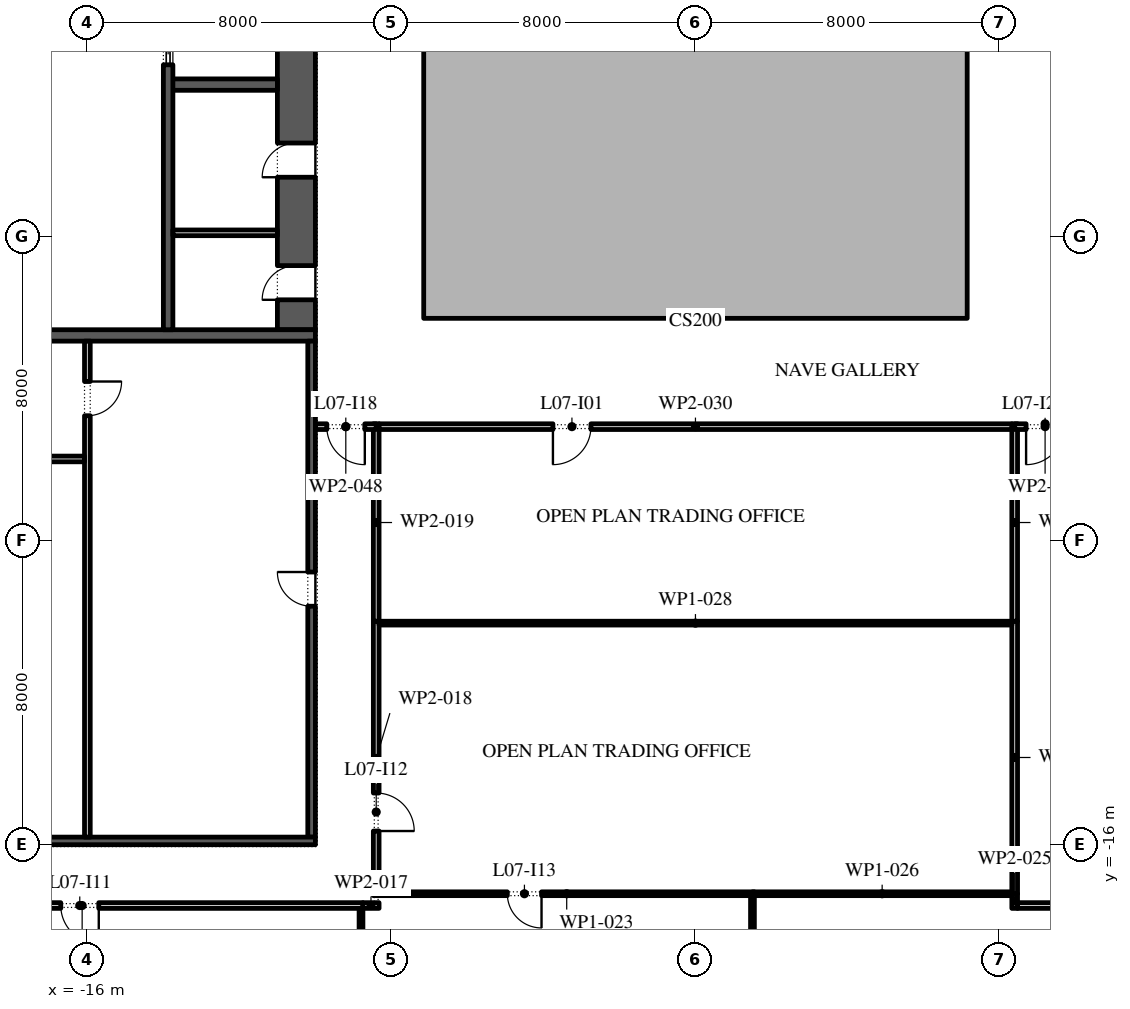
"""IFC4 building model, lengths in metres.
Left out: names, types, materials, properties, quantities, classifications, styles, units other than length and angle.
Written with IfcOpenShell. Run it as: python <this file> out.ifc"""

import sys

from ifc_helpers import new_model, si_unit, direction, frame, frame_2d, origin, place, context, subcontext, project, spatial, polyline, rectangle, outline, extrude, element, fill, save


model = new_model("IFC4")
c1 = context("Model", 3, precision=1e-05, world=origin(), true_north=direction((0.0, 1.0)))
c2 = subcontext(c1, "Body", "Model", "MODEL_VIEW")
j1 = project(units=[si_unit("LENGTHUNIT", "METRE"), si_unit("PLANEANGLEUNIT", "RADIAN")], contexts=[c1])
p1 = place(None, origin())
s1 = spatial("IfcSite", under=j1, at=p1, CompositionType="ELEMENT")
p2 = place(p1, origin())
s2 = spatial("IfcBuilding", under=s1, at=p2, CompositionType="ELEMENT")
p3 = place(p2, frame((0.0, 0.0, 39.6)))
s3 = spatial("IfcBuildingStorey", under=s2, at=p3, CompositionType="ELEMENT", Elevation=39.6)
p4 = place(p3, origin())
e1 = element("IfcWall", 1, at=p4, inside=s3, PredefinedType="STANDARD", context=c2, shape_type="SweptSolid", body=[
    extrude(outline(polyline([(-7.15, -2.15), (7.15, -2.15), (7.15, 16.15), (-7.15, 16.15), (-7.15, -2.15)]), holes=[polyline([(-7.0, -2.0), (-7.0, 16.0), (7.0, 16.0), (7.0, -2.0), (-7.0, -2.0)])]), origin(), (0.0, 0.0, 1.0), 4.0),
])
p5 = place(p3, frame((-10.5, -2.45, 0.0), z_axis=(0.0, 0.0, 1.0), x_axis=(0.0, 1.0, 0.0)))
e2 = element("IfcWall", 2, at=p5, inside=s3, PredefinedType="SHEAR", context=c2, shape_type="SweptSolid", body=[
    extrude(rectangle(XDim=27.9, YDim=1.0, at=frame_2d((13.95, 0.0))), origin(), (0.0, 0.0, 1.0), 4.0),
])
p6 = place(p5, frame((23.65, 0.0, 0.0)))
e3 = element("IfcOpeningElement", 3, at=p6, cuts=e2, PredefinedType="OPENING", context=c2, shape_type="SweptSolid", body=[
    extrude(rectangle(XDim=2.4, YDim=2.1, at=frame_2d((1.2, 1.05))), frame((0.0, 0.51, 0.0), z_axis=(0.0, -1.0, 0.0), x_axis=(1.0, 0.0, 0.0)), (0.0, 0.0, 1.0), 1.02),
])
p7 = place(p5, frame((0.788, 0.0, 0.0)))
e4 = element("IfcOpeningElement", 4, at=p7, cuts=e2, PredefinedType="OPENING", context=c2, shape_type="SweptSolid", body=[
    extrude(rectangle(XDim=0.9, YDim=2.1, at=frame_2d((0.45, 1.05))), frame((0.0, 0.51, 0.0), z_axis=(0.0, -1.0, 0.0), x_axis=(1.0, 0.0, 0.0)), (0.0, 0.0, 1.0), 1.02),
])
p8 = place(p5, frame((4.012, 0.0, 0.0)))
e5 = element("IfcOpeningElement", 5, at=p8, cuts=e2, PredefinedType="OPENING", context=c2, shape_type="SweptSolid", body=[
    extrude(rectangle(XDim=0.9, YDim=2.1, at=frame_2d((0.45, 1.05))), frame((0.0, 0.51, 0.0), z_axis=(0.0, -1.0, 0.0), x_axis=(1.0, 0.0, 0.0)), (0.0, 0.0, 1.0), 1.02),
])
p9 = place(p3, frame((-22.0, -2.6, 0.0), z_axis=(0.0, 0.0, 1.0), x_axis=(1.0, 0.0, 0.0)))
e6 = element("IfcWall", 6, at=p9, inside=s3, PredefinedType="SHEAR", context=c2, shape_type="SweptSolid", body=[
    extrude(rectangle(XDim=12.0, YDim=0.3, at=frame_2d((6.0, 0.0))), origin(), (0.0, 0.0, 1.0), 4.0),
])
p10 = place(p3, frame((-14.0, 4.0, 0.0), z_axis=(0.0, 0.0, 1.0), x_axis=(1.0, 0.0, 0.0)))
e7 = element("IfcWall", 7, at=p10, inside=s3, PredefinedType="SHEAR", context=c2, shape_type="SweptSolid", body=[
    extrude(rectangle(XDim=3.0, YDim=0.3, at=frame_2d((1.5, 0.0))), origin(), (0.0, 0.0, 1.0), 4.0),
])
p11 = place(p3, frame((-13.875, -2.45, 0.0), z_axis=(0.0, 0.0, 1.0), x_axis=(0.0, 1.0, 0.0)))
e8 = element("IfcWall", 8, at=p11, inside=s3, PredefinedType="SHEAR", context=c2, shape_type="SweptSolid", body=[
    extrude(rectangle(XDim=21.3, YDim=0.25, at=frame_2d((10.65, 0.0))), origin(), (0.0, 0.0, 1.0), 4.0),
])
p12 = place(p11, frame((10.396, 0.0, 0.0)))
e9 = element("IfcOpeningElement", 9, at=p12, cuts=e8, PredefinedType="OPENING", context=c2, shape_type="SweptSolid", body=[
    extrude(rectangle(XDim=0.9, YDim=2.1, at=frame_2d((0.45, 1.05))), frame((0.0, 0.135, 0.0), z_axis=(0.0, -1.0, 0.0), x_axis=(1.0, 0.0, 0.0)), (0.0, 0.0, 1.0), 0.27),
])
p13 = place(p11, frame((14.6, 0.0, 0.0)))
e10 = element("IfcOpeningElement", 10, at=p13, cuts=e8, PredefinedType="OPENING", context=c2, shape_type="SweptSolid", body=[
    extrude(rectangle(XDim=0.9, YDim=2.1, at=frame_2d((0.45, 1.05))), frame((0.0, 0.135, 0.0), z_axis=(0.0, -1.0, 0.0), x_axis=(1.0, 0.0, 0.0)), (0.0, 0.0, 1.0), 0.27),
])
p14 = place(p11, frame((18.775, 0.0, 0.0)))
e11 = element("IfcOpeningElement", 11, at=p14, cuts=e8, PredefinedType="OPENING", context=c2, shape_type="SweptSolid", body=[
    extrude(rectangle(XDim=0.9, YDim=2.1, at=frame_2d((0.45, 1.05))), frame((0.0, 0.135, 0.0), z_axis=(0.0, -1.0, 0.0), x_axis=(1.0, 0.0, 0.0)), (0.0, 0.0, 1.0), 0.27),
])
p15 = place(p11, frame((6.971, 0.0, 0.0)))
e12 = element("IfcOpeningElement", 12, at=p15, cuts=e8, PredefinedType="OPENING", context=c2, shape_type="SweptSolid", body=[
    extrude(rectangle(XDim=1.1, YDim=2.1, at=frame_2d((0.55, 1.05))), frame((0.0, 0.135, 0.0), z_axis=(0.0, -1.0, 0.0), x_axis=(1.0, 0.0, 0.0)), (0.0, 0.0, 1.0), 0.27),
])
p16 = place(p3, frame((-13.75, 0.1, 0.0), z_axis=(0.0, 0.0, 1.0), x_axis=(1.0, 0.0, 0.0)))
e13 = element("IfcWall", 13, at=p16, inside=s3, PredefinedType="PARTITIONING", context=c2, shape_type="SweptSolid", body=[
    extrude(rectangle(XDim=2.75, YDim=0.15, at=frame_2d((1.375, 0.0))), origin(), (0.0, 0.0, 1.0), 4.0),
])
p17 = place(p3, frame((-10.1, -15.8, 0.0), z_axis=(0.0, 0.0, 1.0), x_axis=(0.0, 1.0, 0.0)))
e14 = element("IfcWall", 14, at=p17, inside=s3, PredefinedType="SHEAR", context=c2, shape_type="SweptSolid", body=[
    extrude(rectangle(XDim=13.05, YDim=0.2, at=frame_2d((6.525, 0.0))), origin(), (0.0, 0.0, 1.0), 4.0),
])
p18 = place(p17, frame((6.075, 0.0, 0.0)))
e15 = element("IfcOpeningElement", 15, at=p18, cuts=e14, PredefinedType="OPENING", context=c2, shape_type="SweptSolid", body=[
    extrude(rectangle(XDim=0.9, YDim=2.1, at=frame_2d((0.45, 1.05))), frame((0.0, 0.11, 0.0), z_axis=(0.0, -1.0, 0.0), x_axis=(1.0, 0.0, 0.0)), (0.0, 0.0, 1.0), 0.22),
])
p19 = place(p3, frame((-22.0, -15.9, 0.0), z_axis=(0.0, 0.0, 1.0), x_axis=(1.0, 0.0, 0.0)))
e16 = element("IfcWall", 16, at=p19, inside=s3, PredefinedType="SHEAR", context=c2, shape_type="SweptSolid", body=[
    extrude(rectangle(XDim=12.0, YDim=0.2, at=frame_2d((6.0, 0.0))), origin(), (0.0, 0.0, 1.0), 4.0),
])
p20 = place(p3, frame((-16.0, -15.8, 0.0), z_axis=(0.0, 0.0, 1.0), x_axis=(0.0, 1.0, 0.0)))
e17 = element("IfcWall", 17, at=p20, inside=s3, PredefinedType="PARTITIONING", context=c2, shape_type="SweptSolid", body=[
    extrude(rectangle(XDim=13.05, YDim=0.15, at=frame_2d((6.525, 0.0))), origin(), (0.0, 0.0, 1.0), 4.0),
])
p21 = place(p20, frame((11.087, 0.0, 0.0)))
e18 = element("IfcOpeningElement", 18, at=p21, cuts=e17, PredefinedType="OPENING", context=c2, shape_type="SweptSolid", body=[
    extrude(rectangle(XDim=0.9, YDim=2.1, at=frame_2d((0.45, 1.05))), frame((0.0, 0.085, 0.0), z_axis=(0.0, -1.0, 0.0), x_axis=(1.0, 0.0, 0.0)), (0.0, 0.0, 1.0), 0.17),
])
p22 = place(p3, frame((-21.8, -5.85, 0.0), z_axis=(0.0, 0.0, 1.0), x_axis=(1.0, 0.0, 0.0)))
e19 = element("IfcWall", 19, at=p22, inside=s3, PredefinedType="PARTITIONING", context=c2, shape_type="SweptSolid", body=[
    extrude(rectangle(XDim=5.725, YDim=0.15, at=frame_2d((2.863, 0.0))), origin(), (0.0, 0.0, 1.0), 4.0),
])
p23 = place(p3, frame((-8.75, -17.6, 0.0), z_axis=(0.0, 0.0, 1.0), x_axis=(-1.0, 0.0, 0.0)))
e20 = element("IfcWall", 20, at=p23, inside=s3, PredefinedType="PARTITIONING", context=c2, shape_type="SweptSolid", body=[
    extrude(rectangle(XDim=14.775, YDim=0.15, at=frame_2d((7.387, 0.0))), origin(), (0.0, 0.0, 1.0), 4.0),
])
p24 = place(p23, frame((6.95, 0.0, 0.0)))
e21 = element("IfcOpeningElement", 21, at=p24, cuts=e20, PredefinedType="OPENING", context=c2, shape_type="SweptSolid", body=[
    extrude(rectangle(XDim=1.0, YDim=2.1, at=frame_2d((0.5, 1.05))), frame((0.0, 0.085, 0.0), z_axis=(0.0, -1.0, 0.0), x_axis=(1.0, 0.0, 0.0)), (0.0, 0.0, 1.0), 0.17),
])
p25 = place(p3, frame((-8.8, -17.675, 0.0), z_axis=(0.0, 0.0, 1.0), x_axis=(0.0, -1.0, 0.0)))
e22 = element("IfcWall", 22, at=p25, inside=s3, PredefinedType="PARTITIONING", context=c2, shape_type="SweptSolid", body=[
    extrude(rectangle(XDim=6.675, YDim=0.1, at=frame_2d((3.337, 0.0))), origin(), (0.0, 0.0, 1.0), 4.0),
])
p26 = place(p3, frame((-8.325, -17.6, 0.0), z_axis=(0.0, 0.0, 1.0), x_axis=(-1.0, 0.0, 0.0)))
e23 = element("IfcWall", 23, at=p26, inside=s3, PredefinedType="PARTITIONING", context=c2, shape_type="SweptSolid", body=[
    extrude(rectangle(XDim=0.425, YDim=0.15, at=frame_2d((0.212, 0.0))), origin(), (0.0, 0.0, 1.0), 4.0),
])
p27 = place(p3, frame((-8.4, -10.12, 0.0), z_axis=(0.0, 0.0, 1.0), x_axis=(0.0, -1.0, 0.0)))
e24 = element("IfcWall", 24, at=p27, inside=s3, PredefinedType="PARTITIONING", context=c2, shape_type="SweptSolid", body=[
    extrude(rectangle(XDim=7.22, YDim=0.15, at=frame_2d((3.61, 0.0))), origin(), (0.0, 0.0, 1.0), 4.0),
])
p28 = place(p27, frame((4.52, 0.0, 0.0)))
e25 = element("IfcOpeningElement", 25, at=p28, cuts=e24, PredefinedType="OPENING", context=c2, shape_type="SweptSolid", body=[
    extrude(rectangle(XDim=1.0, YDim=2.1, at=frame_2d((0.5, 1.05))), frame((0.0, 0.085, 0.0), z_axis=(0.0, -1.0, 0.0), x_axis=(1.0, 0.0, 0.0)), (0.0, 0.0, 1.0), 0.17),
])
p29 = place(p3, frame((-8.4, -4.925, 0.0), z_axis=(0.0, 0.0, 1.0), x_axis=(0.0, -1.0, 0.0)))
e26 = element("IfcWall", 26, at=p29, inside=s3, PredefinedType="PARTITIONING", context=c2, shape_type="SweptSolid", body=[
    extrude(rectangle(XDim=5.195, YDim=0.15, at=frame_2d((2.598, 0.0))), origin(), (0.0, 0.0, 1.0), 4.0),
])
p30 = place(p3, frame((1.55, -17.29, 0.0), z_axis=(0.0, 0.0, 1.0), x_axis=(-1.0, 0.0, 0.0)))
e27 = element("IfcWall", 27, at=p30, inside=s3, PredefinedType="PARTITIONING", context=c2, shape_type="SweptSolid", body=[
    extrude(rectangle(XDim=9.875, YDim=0.1, at=frame_2d((4.938, 0.0))), origin(), (0.0, 0.0, 1.0), 4.0),
])
p31 = place(p30, frame((5.6, 0.0, 0.0)))
e28 = element("IfcOpeningElement", 28, at=p31, cuts=e27, PredefinedType="OPENING", context=c2, shape_type="SweptSolid", body=[
    extrude(rectangle(XDim=0.9, YDim=2.1, at=frame_2d((0.45, 1.05))), frame((0.0, 0.06, 0.0), z_axis=(0.0, -1.0, 0.0), x_axis=(1.0, 0.0, 0.0)), (0.0, 0.0, 1.0), 0.12),
])
p32 = place(p3, frame((1.5, -17.34, 0.0), z_axis=(0.0, 0.0, 1.0), x_axis=(0.0, -1.0, 0.0)))
e29 = element("IfcWall", 29, at=p32, inside=s3, PredefinedType="PARTITIONING", context=c2, shape_type="SweptSolid", body=[
    extrude(rectangle(XDim=7.01, YDim=0.1, at=frame_2d((3.505, 0.0))), origin(), (0.0, 0.0, 1.0), 4.0),
])
p33 = place(p3, frame((8.4, -17.675, 0.0), z_axis=(0.0, 0.0, 1.0), x_axis=(0.0, 1.0, 0.0)))
e30 = element("IfcWall", 30, at=p33, inside=s3, PredefinedType="PARTITIONING", context=c2, shape_type="SweptSolid", body=[
    extrude(rectangle(XDim=0.385, YDim=0.15, at=frame_2d((0.192, 0.0))), origin(), (0.0, 0.0, 1.0), 4.0),
])
p34 = place(p3, frame((8.325, -17.29, 0.0), z_axis=(0.0, 0.0, 1.0), x_axis=(-1.0, 0.0, 0.0)))
e31 = element("IfcWall", 31, at=p34, inside=s3, PredefinedType="PARTITIONING", context=c2, shape_type="SweptSolid", body=[
    extrude(rectangle(XDim=6.825, YDim=0.1, at=frame_2d((3.413, 0.0))), origin(), (0.0, 0.0, 1.0), 4.0),
])
p35 = place(p3, frame((8.4, -17.29, 0.0), z_axis=(0.0, 0.0, 1.0), x_axis=(0.0, 1.0, 0.0)))
e32 = element("IfcWall", 32, at=p35, inside=s3, PredefinedType="PARTITIONING", context=c2, shape_type="SweptSolid", body=[
    extrude(rectangle(XDim=7.17, YDim=0.15, at=frame_2d((3.585, 0.0))), origin(), (0.0, 0.0, 1.0), 4.0),
])
p36 = place(p3, frame((8.325, -10.17, 0.0), z_axis=(0.0, 0.0, 1.0), x_axis=(-1.0, 0.0, 0.0)))
e33 = element("IfcWall", 33, at=p36, inside=s3, PredefinedType="PARTITIONING", context=c2, shape_type="SweptSolid", body=[
    extrude(rectangle(XDim=16.65, YDim=0.1, at=frame_2d((8.325, 0.0))), origin(), (0.0, 0.0, 1.0), 4.0),
])
p37 = place(p3, frame((8.4, -10.12, 0.0), z_axis=(0.0, 0.0, 1.0), x_axis=(0.0, 1.0, 0.0)))
e34 = element("IfcWall", 34, at=p37, inside=s3, PredefinedType="PARTITIONING", context=c2, shape_type="SweptSolid", body=[
    extrude(rectangle(XDim=5.195, YDim=0.15, at=frame_2d((2.598, 0.0))), origin(), (0.0, 0.0, 1.0), 4.0),
])
p38 = place(p3, frame((8.325, -5.0, 0.0), z_axis=(0.0, 0.0, 1.0), x_axis=(-1.0, 0.0, 0.0)))
e35 = element("IfcWall", 35, at=p38, inside=s3, PredefinedType="PARTITIONING", context=c2, shape_type="SweptSolid", body=[
    extrude(rectangle(XDim=16.65, YDim=0.15, at=frame_2d((8.325, 0.0))), origin(), (0.0, 0.0, 1.0), 4.0),
])
p39 = place(p38, frame((11.075, 0.0, 0.0)))
e36 = element("IfcOpeningElement", 36, at=p39, cuts=e35, PredefinedType="OPENING", context=c2, shape_type="SweptSolid", body=[
    extrude(rectangle(XDim=1.0, YDim=2.1, at=frame_2d((0.5, 1.05))), frame((0.0, 0.085, 0.0), z_axis=(0.0, -1.0, 0.0), x_axis=(1.0, 0.0, 0.0)), (0.0, 0.0, 1.0), 0.17),
])
p40 = place(p3, frame((15.0, -17.6, 0.0), z_axis=(0.0, 0.0, 1.0), x_axis=(-1.0, 0.0, 0.0)))
e37 = element("IfcWall", 37, at=p40, inside=s3, PredefinedType="PARTITIONING", context=c2, shape_type="SweptSolid", body=[
    extrude(rectangle(XDim=6.525, YDim=0.15, at=frame_2d((3.262, 0.0))), origin(), (0.0, 0.0, 1.0), 4.0),
])
p41 = place(p40, frame((2.7, 0.0, 0.0)))
e38 = element("IfcOpeningElement", 38, at=p41, cuts=e37, PredefinedType="OPENING", context=c2, shape_type="SweptSolid", body=[
    extrude(rectangle(XDim=1.0, YDim=2.1, at=frame_2d((0.5, 1.05))), frame((0.0, 0.085, 0.0), z_axis=(0.0, -1.0, 0.0), x_axis=(1.0, 0.0, 0.0)), (0.0, 0.0, 1.0), 0.17),
])
p42 = place(p3, frame((-8.4, -5.0, 0.0), z_axis=(0.0, 0.0, 1.0), x_axis=(-1.0, 0.0, 0.0)))
e39 = element("IfcWall", 39, at=p42, inside=s3, PredefinedType="PARTITIONING", context=c2, shape_type="SweptSolid", body=[
    extrude(rectangle(XDim=1.6, YDim=0.15, at=frame_2d((0.8, 0.0))), origin(), (0.0, 0.0, 1.0), 4.0),
])
p43 = place(p42, frame((0.3, 0.0, 0.0)))
e40 = element("IfcOpeningElement", 40, at=p43, cuts=e39, PredefinedType="OPENING", context=c2, shape_type="SweptSolid", body=[
    extrude(rectangle(XDim=1.0, YDim=2.1, at=frame_2d((0.5, 1.05))), frame((0.0, 0.085, 0.0), z_axis=(0.0, -1.0, 0.0), x_axis=(1.0, 0.0, 0.0)), (0.0, 0.0, 1.0), 0.17),
])
p44 = place(p3, frame((10.0, -5.0, 0.0), z_axis=(0.0, 0.0, 1.0), x_axis=(-1.0, 0.0, 0.0)))
e41 = element("IfcWall", 41, at=p44, inside=s3, PredefinedType="PARTITIONING", context=c2, shape_type="SweptSolid", body=[
    extrude(rectangle(XDim=1.6, YDim=0.15, at=frame_2d((0.8, 0.0))), origin(), (0.0, 0.0, 1.0), 4.0),
])
p45 = place(p44, frame((0.3, 0.0, 0.0)))
e42 = element("IfcOpeningElement", 42, at=p45, cuts=e41, PredefinedType="OPENING", context=c2, shape_type="SweptSolid", body=[
    extrude(rectangle(XDim=1.0, YDim=2.1, at=frame_2d((0.5, 1.05))), frame((0.0, 0.085, 0.0), z_axis=(0.0, -1.0, 0.0), x_axis=(1.0, 0.0, 0.0)), (0.0, 0.0, 1.0), 0.17),
])
p46 = place(p15, origin())
e43 = element("IfcDoor", 43, at=p46, inside=s3, OperationType="SLIDING_TO_LEFT", PredefinedType="DOOR", context=c2, shape_type="SweptSolid", body=[
    extrude(rectangle(XDim=1.1, YDim=2.1, at=frame_2d((0.55, 1.05))), frame((0.0, 0.025, 0.0), z_axis=(0.0, -1.0, 0.0), x_axis=(1.0, 0.0, 0.0)), (0.0, 0.0, 1.0), 0.05),
])
fill(e12, e43)
p47 = place(p7, origin())
e44 = element("IfcDoor", 44, at=p47, inside=s3, OperationType="SINGLE_SWING_RIGHT", PredefinedType="DOOR", context=c2, shape_type="SweptSolid", body=[
    extrude(rectangle(XDim=0.9, YDim=2.1, at=frame_2d((0.45, 1.05))), frame((0.0, 0.5, 0.0), z_axis=(0.0, -1.0, 0.0), x_axis=(1.0, 0.0, 0.0)), (0.0, 0.0, 1.0), 0.05),
])
fill(e4, e44)
p48 = place(p8, origin())
e45 = element("IfcDoor", 45, at=p48, inside=s3, OperationType="SINGLE_SWING_RIGHT", PredefinedType="DOOR", context=c2, shape_type="SweptSolid", body=[
    extrude(rectangle(XDim=0.9, YDim=2.1, at=frame_2d((0.45, 1.05))), frame((0.0, 0.5, 0.0), z_axis=(0.0, -1.0, 0.0), x_axis=(1.0, 0.0, 0.0)), (0.0, 0.0, 1.0), 0.05),
])
fill(e5, e45)
p49 = place(p21, frame((0.9, 0.0, 0.0), z_axis=(0.0, 0.0, 1.0), x_axis=(-1.0, 0.0, 0.0)))
e46 = element("IfcDoor", 46, at=p49, inside=s3, OperationType="SINGLE_SWING_RIGHT", PredefinedType="DOOR", context=c2, shape_type="SweptSolid", body=[
    extrude(rectangle(XDim=0.9, YDim=2.1, at=frame_2d((0.45, 1.05))), frame((0.0, 0.025, 0.0), z_axis=(0.0, -1.0, 0.0), x_axis=(1.0, 0.0, 0.0)), (0.0, 0.0, 1.0), 0.05),
])
fill(e18, e46)
p50 = place(p18, origin())
e47 = element("IfcDoor", 47, at=p50, inside=s3, OperationType="SINGLE_SWING_LEFT", PredefinedType="DOOR", context=c2, shape_type="SweptSolid", body=[
    extrude(rectangle(XDim=0.9, YDim=2.1, at=frame_2d((0.45, 1.05))), frame((0.0, 0.1, 0.0), z_axis=(0.0, -1.0, 0.0), x_axis=(1.0, 0.0, 0.0)), (0.0, 0.0, 1.0), 0.05),
])
fill(e15, e47)
p51 = place(p39, origin())
e48 = element("IfcDoor", 48, at=p51, inside=s3, OperationType="SINGLE_SWING_LEFT", PredefinedType="DOOR", context=c2, shape_type="SweptSolid", body=[
    extrude(rectangle(XDim=1.0, YDim=2.1, at=frame_2d((0.5, 1.05))), frame((0.0, 0.025, 0.0), z_axis=(0.0, -1.0, 0.0), x_axis=(1.0, 0.0, 0.0)), (0.0, 0.0, 1.0), 0.05),
])
fill(e36, e48)
p52 = place(p24, origin())
e49 = element("IfcDoor", 49, at=p52, inside=s3, OperationType="SINGLE_SWING_RIGHT", PredefinedType="DOOR", context=c2, shape_type="SweptSolid", body=[
    extrude(rectangle(XDim=1.0, YDim=2.1, at=frame_2d((0.5, 1.05))), frame((0.0, 0.025, 0.0), z_axis=(0.0, -1.0, 0.0), x_axis=(1.0, 0.0, 0.0)), (0.0, 0.0, 1.0), 0.05),
])
fill(e21, e49)
p53 = place(p28, origin())
e50 = element("IfcDoor", 50, at=p53, inside=s3, OperationType="SINGLE_SWING_LEFT", PredefinedType="DOOR", context=c2, shape_type="SweptSolid", body=[
    extrude(rectangle(XDim=1.0, YDim=2.1, at=frame_2d((0.5, 1.05))), frame((0.0, 0.025, 0.0), z_axis=(0.0, -1.0, 0.0), x_axis=(1.0, 0.0, 0.0)), (0.0, 0.0, 1.0), 0.05),
])
fill(e25, e50)
p54 = place(p31, origin())
e51 = element("IfcDoor", 51, at=p54, inside=s3, OperationType="SINGLE_SWING_RIGHT", PredefinedType="DOOR", context=c2, shape_type="SweptSolid", body=[
    extrude(rectangle(XDim=0.9, YDim=2.1, at=frame_2d((0.45, 1.05))), frame((0.0, 0.025, 0.0), z_axis=(0.0, -1.0, 0.0), x_axis=(1.0, 0.0, 0.0)), (0.0, 0.0, 1.0), 0.05),
])
fill(e28, e51)
p55 = place(p43, origin())
e52 = element("IfcDoor", 52, at=p55, inside=s3, OperationType="SINGLE_SWING_RIGHT", PredefinedType="DOOR", context=c2, shape_type="SweptSolid", body=[
    extrude(rectangle(XDim=1.0, YDim=2.1, at=frame_2d((0.5, 1.05))), frame((0.0, 0.025, 0.0), z_axis=(0.0, -1.0, 0.0), x_axis=(1.0, 0.0, 0.0)), (0.0, 0.0, 1.0), 0.05),
])
fill(e40, e52)
p56 = place(p45, origin())
e53 = element("IfcDoor", 53, at=p56, inside=s3, OperationType="SINGLE_SWING_LEFT", PredefinedType="DOOR", context=c2, shape_type="SweptSolid", body=[
    extrude(rectangle(XDim=1.0, YDim=2.1, at=frame_2d((0.5, 1.05))), frame((0.0, 0.025, 0.0), z_axis=(0.0, -1.0, 0.0), x_axis=(1.0, 0.0, 0.0)), (0.0, 0.0, 1.0), 0.05),
])
fill(e42, e53)
save(model, sys.argv[1])
